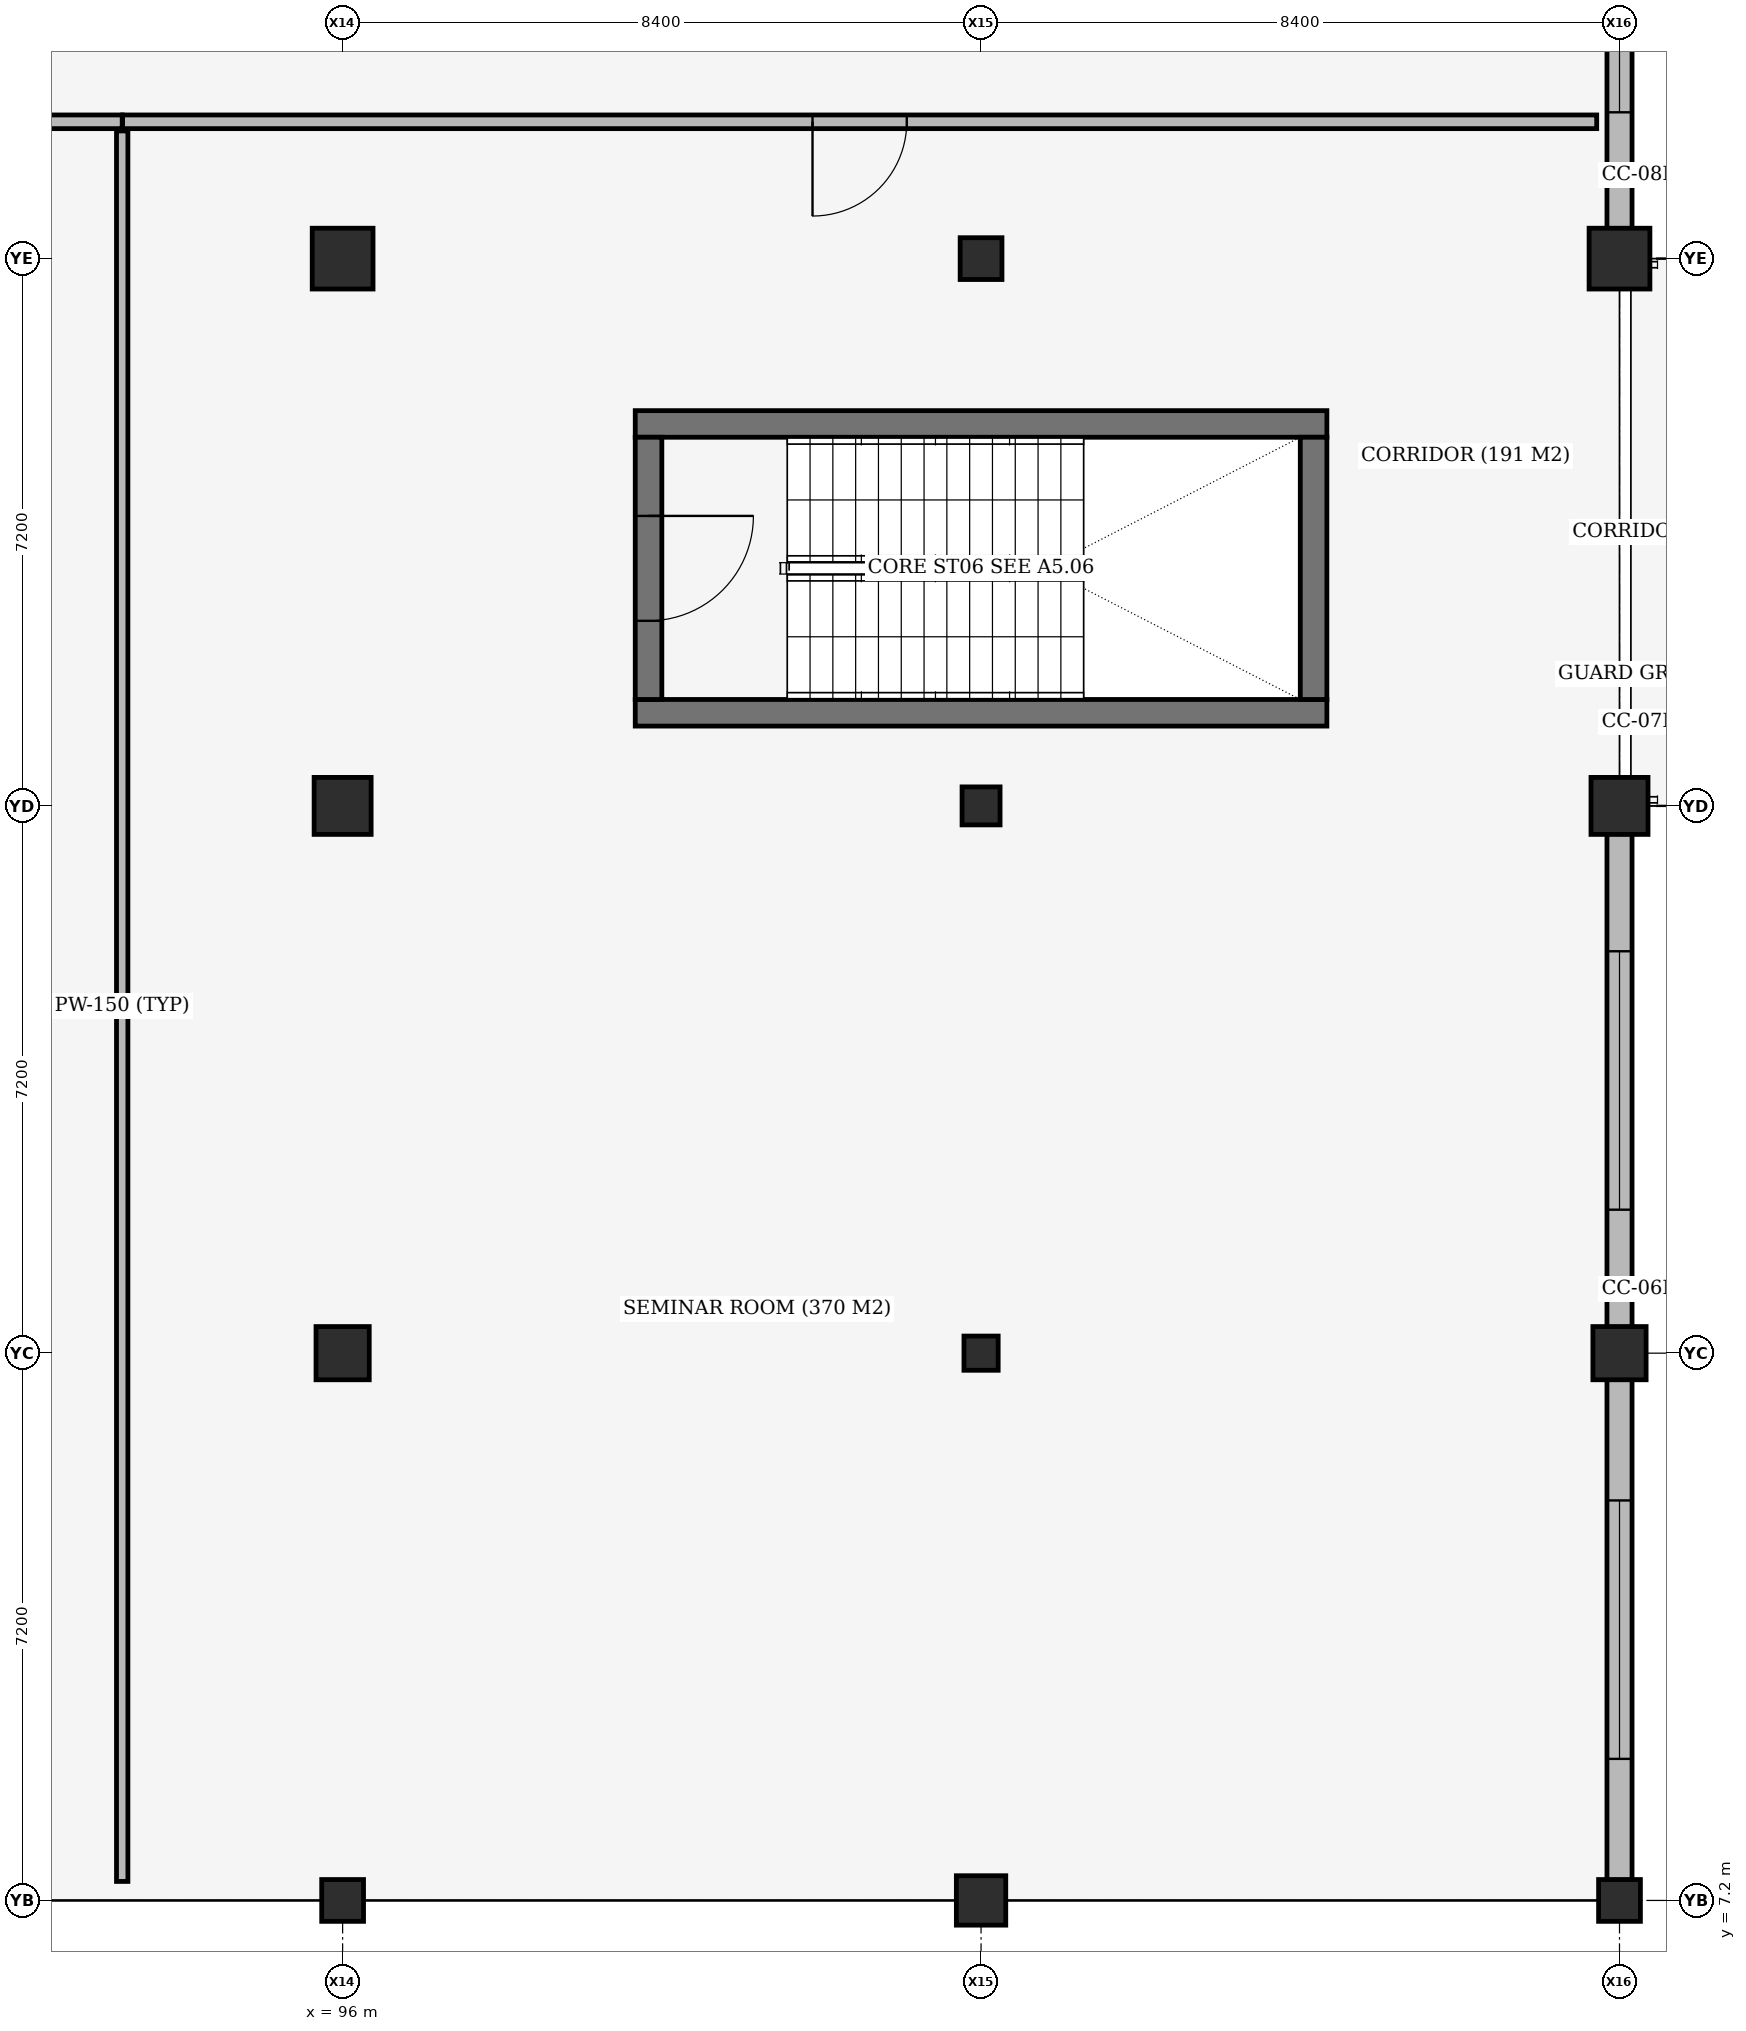
"""IFC4 building model, lengths in metres.
Left out: names, types, materials, properties, quantities, classifications, styles, units other than length and angle.
Written with IfcOpenShell. Run it as: python <this file> out.ifc"""

import sys

from ifc_helpers import new_model, si_unit, direction, frame, frame_2d, origin, origin_2d, place, context, subcontext, project, spatial, rectangle, circle, extrude, element, fill, save


model = new_model("IFC4")
c1 = context("Model", 3, precision=1e-05, world=origin(), true_north=direction((0.0, 1.0)))
c2 = subcontext(c1, "Body", "Model", "MODEL_VIEW")
j1 = project(units=[si_unit("LENGTHUNIT", "METRE"), si_unit("PLANEANGLEUNIT", "RADIAN")], contexts=[c1])
p1 = place(None, origin())
s1 = spatial("IfcSite", under=j1, at=p1, CompositionType="ELEMENT")
p2 = place(p1, origin())
s2 = spatial("IfcBuilding", under=s1, at=p2, CompositionType="ELEMENT")
p3 = place(p2, frame((0.0, 0.0, 5.4)))
s3 = spatial("IfcBuildingStorey", under=s2, at=p3, CompositionType="ELEMENT", Elevation=5.4)
p4 = place(p3, frame((96.0, 7.2, 0.0), z_axis=(0.0, 0.0, 1.0), x_axis=(1.0, 0.0, 0.0)))
e1 = element("IfcColumn", 1, at=p4, inside=s3, PredefinedType="COLUMN", context=c2, shape_type="SweptSolid", body=[
    extrude(circle(Radius=0.275, at=origin_2d()), origin(), (0.0, 0.0, 1.0), 3.96),
])
p5 = place(p3, frame((96.0, 14.4, 0.0), z_axis=(0.0, 0.0, 1.0), x_axis=(1.0, 0.0, 0.0)))
e2 = element("IfcColumn", 2, at=p5, inside=s3, PredefinedType="COLUMN", context=c2, shape_type="SweptSolid", body=[
    extrude(rectangle(XDim=0.7, YDim=0.7, at=origin_2d()), origin(), (0.0, 0.0, 1.0), 3.92),
])
p6 = place(p3, frame((96.0, 21.6, 0.0), z_axis=(0.0, 0.0, 1.0), x_axis=(1.0, 0.0, 0.0)))
e3 = element("IfcColumn", 3, at=p6, inside=s3, PredefinedType="COLUMN", context=c2, shape_type="SweptSolid", body=[
    extrude(rectangle(XDim=0.75, YDim=0.75, at=origin_2d()), origin(), (0.0, 0.0, 1.0), 3.92),
])
p7 = place(p3, frame((96.0, 28.8, 0.0), z_axis=(0.0, 0.0, 1.0), x_axis=(1.0, 0.0, 0.0)))
e4 = element("IfcColumn", 4, at=p7, inside=s3, PredefinedType="COLUMN", context=c2, shape_type="SweptSolid", body=[
    extrude(rectangle(XDim=0.8, YDim=0.8, at=origin_2d()), origin(), (0.0, 0.0, 1.0), 3.92),
])
p8 = place(p3, frame((104.4, 7.2, 0.0), z_axis=(0.0, 0.0, 1.0), x_axis=(1.0, 0.0, 0.0)))
e5 = element("IfcColumn", 5, at=p8, inside=s3, PredefinedType="COLUMN", context=c2, shape_type="SweptSolid", body=[
    extrude(circle(Radius=0.325, at=origin_2d()), origin(), (0.0, 0.0, 1.0), 3.96),
])
p9 = place(p3, frame((104.4, 14.4, 0.0), z_axis=(0.0, 0.0, 1.0), x_axis=(1.0, 0.0, 0.0)))
e6 = element("IfcColumn", 6, at=p9, inside=s3, PredefinedType="COLUMN", context=c2, shape_type="SweptSolid", body=[
    extrude(rectangle(XDim=0.45, YDim=0.45, at=origin_2d()), origin(), (0.0, 0.0, 1.0), 3.92),
])
p10 = place(p3, frame((104.4, 21.6, 0.0), z_axis=(0.0, 0.0, 1.0), x_axis=(1.0, 0.0, 0.0)))
e7 = element("IfcColumn", 7, at=p10, inside=s3, PredefinedType="COLUMN", context=c2, shape_type="SweptSolid", body=[
    extrude(rectangle(XDim=0.5, YDim=0.5, at=origin_2d()), origin(), (0.0, 0.0, 1.0), 3.92),
])
p11 = place(p3, frame((104.4, 28.8, 0.0), z_axis=(0.0, 0.0, 1.0), x_axis=(1.0, 0.0, 0.0)))
e8 = element("IfcColumn", 8, at=p11, inside=s3, PredefinedType="COLUMN", context=c2, shape_type="SweptSolid", body=[
    extrude(rectangle(XDim=0.55, YDim=0.55, at=origin_2d()), origin(), (0.0, 0.0, 1.0), 3.92),
])
p12 = place(p3, frame((112.8, 7.2, 0.0), z_axis=(0.0, 0.0, 1.0), x_axis=(1.0, 0.0, 0.0)))
e9 = element("IfcColumn", 9, at=p12, inside=s3, PredefinedType="COLUMN", context=c2, shape_type="SweptSolid", body=[
    extrude(circle(Radius=0.275, at=origin_2d()), origin(), (0.0, 0.0, 1.0), 3.96),
])
p13 = place(p3, frame((112.8, 14.4, 0.0), z_axis=(0.0, 0.0, 1.0), x_axis=(1.0, 0.0, 0.0)))
e10 = element("IfcColumn", 10, at=p13, inside=s3, PredefinedType="COLUMN", context=c2, shape_type="SweptSolid", body=[
    extrude(rectangle(XDim=0.7, YDim=0.7, at=origin_2d()), origin(), (0.0, 0.0, 1.0), 3.92),
])
p14 = place(p3, frame((112.8, 21.6, 0.0), z_axis=(0.0, 0.0, 1.0), x_axis=(1.0, 0.0, 0.0)))
e11 = element("IfcColumn", 11, at=p14, inside=s3, PredefinedType="COLUMN", context=c2, shape_type="SweptSolid", body=[
    extrude(rectangle(XDim=0.75, YDim=0.75, at=origin_2d()), origin(), (0.0, 0.0, 1.0), 3.92),
])
p15 = place(p3, frame((112.8, 28.8, 0.0), z_axis=(0.0, 0.0, 1.0), x_axis=(1.0, 0.0, 0.0)))
e12 = element("IfcColumn", 12, at=p15, inside=s3, PredefinedType="COLUMN", context=c2, shape_type="SweptSolid", body=[
    extrude(rectangle(XDim=0.8, YDim=0.8, at=origin_2d()), origin(), (0.0, 0.0, 1.0), 3.92),
])
for number, where, z_axis, x_axis in (
    (13, (99.85, 22.825, 0.0), (0.0, 0.0, 1.0), (1.0, 0.0, 0.0)),
    (14, (108.95, 26.625, 0.0), (0.0, 0.0, 1.0), (-1.0, 0.0, 0.0)),
):
    element("IfcWall", number, at=place(p3, frame(where, z_axis=z_axis, x_axis=x_axis)), inside=s3, PredefinedType="SHEAR", context=c2, shape_type="SweptSolid", body=[
        extrude(rectangle(XDim=9.1, YDim=0.35, at=frame_2d((4.55, 0.0))), origin(), (0.0, 0.0, 1.0), 3.92),
    ])
p16 = place(p3, frame((108.775, 23.0, 0.0), z_axis=(0.0, 0.0, 1.0), x_axis=(0.0, 1.0, 0.0)))
e15 = element("IfcWall", 15, at=p16, inside=s3, PredefinedType="SHEAR", context=c2, shape_type="SweptSolid", body=[
    extrude(rectangle(XDim=3.45, YDim=0.35, at=frame_2d((1.725, 0.0))), origin(), (0.0, 0.0, 1.0), 3.92),
])
p17 = place(p3, frame((112.8, 14.058, 0.0), z_axis=(0.0, 0.0, 1.0), x_axis=(0.0, -1.0, 0.0)))
e16 = element("IfcWall", 16, at=p17, inside=s3, PredefinedType="STANDARD", context=c2, shape_type="SweptSolid", body=[
    extrude(rectangle(XDim=6.591, YDim=0.33, at=frame_2d((3.295, 0.0))), origin(), (0.0, 0.0, 1.0), 3.92),
])
p18 = place(p17, frame((1.595, 0.0, 0.9)))
e17 = element("IfcOpeningElement", 17, at=p18, cuts=e16, PredefinedType="OPENING", context=c2, shape_type="SweptSolid", body=[
    extrude(rectangle(XDim=3.4, YDim=1.5, at=frame_2d((1.7, 0.75))), frame((0.0, 0.175, 0.0), z_axis=(0.0, -1.0, 0.0), x_axis=(1.0, 0.0, 0.0)), (0.0, 0.0, 1.0), 0.35),
])
p19 = place(p3, frame((112.8, 21.233, 0.0), z_axis=(0.0, 0.0, 1.0), x_axis=(0.0, -1.0, 0.0)))
e18 = element("IfcWall", 18, at=p19, inside=s3, PredefinedType="STANDARD", context=c2, shape_type="SweptSolid", body=[
    extrude(rectangle(XDim=6.491, YDim=0.33, at=frame_2d((3.246, 0.0))), origin(), (0.0, 0.0, 1.0), 3.34),
])
p20 = place(p19, frame((1.545, 0.0, 0.9)))
e19 = element("IfcOpeningElement", 19, at=p20, cuts=e18, PredefinedType="OPENING", context=c2, shape_type="SweptSolid", body=[
    extrude(rectangle(XDim=3.4, YDim=1.5, at=frame_2d((1.7, 0.75))), frame((0.0, 0.175, 0.0), z_axis=(0.0, -1.0, 0.0), x_axis=(1.0, 0.0, 0.0)), (0.0, 0.0, 1.0), 0.35),
])
p21 = place(p3, frame((112.8, 35.658, 0.0), z_axis=(0.0, 0.0, 1.0), x_axis=(0.0, -1.0, 0.0)))
e20 = element("IfcWall", 20, at=p21, inside=s3, PredefinedType="STANDARD", context=c2, shape_type="SweptSolid", body=[
    extrude(rectangle(XDim=6.466, YDim=0.33, at=frame_2d((3.233, 0.0))), origin(), (0.0, 0.0, 1.0), 3.24),
])
p22 = place(p21, frame((1.533, 0.0, 0.9)))
e21 = element("IfcOpeningElement", 21, at=p22, cuts=e20, PredefinedType="OPENING", context=c2, shape_type="SweptSolid", body=[
    extrude(rectangle(XDim=3.4, YDim=1.5, at=frame_2d((1.7, 0.75))), frame((0.0, 0.175, 0.0), z_axis=(0.0, -1.0, 0.0), x_axis=(1.0, 0.0, 0.0)), (0.0, 0.0, 1.0), 0.35),
])
p23 = place(p3, frame((100.025, 26.45, 0.0), z_axis=(0.0, 0.0, 1.0), x_axis=(0.0, -1.0, 0.0)))
e22 = element("IfcWall", 22, at=p23, inside=s3, PredefinedType="SHEAR", context=c2, shape_type="SweptSolid", body=[
    extrude(rectangle(XDim=3.45, YDim=0.35, at=frame_2d((1.725, 0.0))), origin(), (0.0, 0.0, 1.0), 3.92),
])
p24 = place(p23, frame((1.035, 0.0, 0.0)))
e23 = element("IfcOpeningElement", 23, at=p24, cuts=e22, PredefinedType="OPENING", context=c2, shape_type="SweptSolid", body=[
    extrude(rectangle(XDim=1.38, YDim=2.2, at=frame_2d((0.69, 1.1))), frame((0.0, 0.185, 0.0), z_axis=(0.0, -1.0, 0.0), x_axis=(1.0, 0.0, 0.0)), (0.0, 0.0, 1.0), 0.37),
])
p25 = place(p3, frame((79.205, 30.6, 0.0), z_axis=(0.0, 0.0, 1.0), x_axis=(1.0, 0.0, 0.0)))
e24 = element("IfcWall", 24, at=p25, inside=s3, PredefinedType="PARTITIONING", context=c2, shape_type="SweptSolid", body=[
    extrude(rectangle(XDim=13.895, YDim=0.18, at=frame_2d((6.948, 0.0))), origin(), (0.0, 0.0, 1.0), 3.28),
])
p26 = place(p25, frame((6.337, 0.0, 0.0)))
e25 = element("IfcOpeningElement", 25, at=p26, cuts=e24, PredefinedType="OPENING", context=c2, shape_type="SweptSolid", body=[
    extrude(rectangle(XDim=1.22, YDim=2.25, at=frame_2d((0.61, 1.125))), frame((0.0, 0.1, 0.0), z_axis=(0.0, -1.0, 0.0), x_axis=(1.0, 0.0, 0.0)), (0.0, 0.0, 1.0), 0.2),
])
p27 = place(p3, frame((93.1, 7.45, 0.0), z_axis=(0.0, 0.0, 1.0), x_axis=(0.0, 1.0, 0.0)))
e26 = element("IfcWall", 26, at=p27, inside=s3, PredefinedType="PARTITIONING", context=c2, shape_type="SweptSolid", body=[
    extrude(rectangle(XDim=23.03, YDim=0.15, at=frame_2d((11.515, 0.0))), origin(), (0.0, 0.0, 1.0), 3.24),
])
p28 = place(p3, frame((93.105, 30.6, 0.0), z_axis=(0.0, 0.0, 1.0), x_axis=(1.0, 0.0, 0.0)))
e27 = element("IfcWall", 27, at=p28, inside=s3, PredefinedType="PARTITIONING", context=c2, shape_type="SweptSolid", body=[
    extrude(rectangle(XDim=19.395, YDim=0.18, at=frame_2d((9.698, 0.0))), origin(), (0.0, 0.0, 1.0), 3.24),
])
p29 = place(p28, frame((9.077, 0.0, 0.0)))
e28 = element("IfcOpeningElement", 28, at=p29, cuts=e27, PredefinedType="OPENING", context=c2, shape_type="SweptSolid", body=[
    extrude(rectangle(XDim=1.24, YDim=2.25, at=frame_2d((0.62, 1.125))), frame((0.0, 0.1, 0.0), z_axis=(0.0, -1.0, 0.0), x_axis=(1.0, 0.0, 0.0)), (0.0, 0.0, 1.0), 0.2),
])
p30 = place(p18, origin())
e29 = element("IfcWindow", 29, at=p30, inside=s3, PartitioningType="DOUBLE_PANEL_VERTICAL", PredefinedType="WINDOW", context=c2, shape_type="SweptSolid", body=[
    extrude(rectangle(XDim=3.4, YDim=1.5, at=frame_2d((1.7, 0.75))), frame((0.0, 0.03, 0.0), z_axis=(0.0, -1.0, 0.0), x_axis=(1.0, 0.0, 0.0)), (0.0, 0.0, 1.0), 0.06),
])
fill(e17, e29)
p31 = place(p20, origin())
e30 = element("IfcWindow", 30, at=p31, inside=s3, PartitioningType="DOUBLE_PANEL_VERTICAL", PredefinedType="WINDOW", context=c2, shape_type="SweptSolid", body=[
    extrude(rectangle(XDim=3.4, YDim=1.5, at=frame_2d((1.7, 0.75))), frame((0.0, 0.03, 0.0), z_axis=(0.0, -1.0, 0.0), x_axis=(1.0, 0.0, 0.0)), (0.0, 0.0, 1.0), 0.06),
])
fill(e19, e30)
p32 = place(p22, origin())
e31 = element("IfcWindow", 31, at=p32, inside=s3, PartitioningType="DOUBLE_PANEL_VERTICAL", PredefinedType="WINDOW", context=c2, shape_type="SweptSolid", body=[
    extrude(rectangle(XDim=3.4, YDim=1.5, at=frame_2d((1.7, 0.75))), frame((0.0, 0.03, 0.0), z_axis=(0.0, -1.0, 0.0), x_axis=(1.0, 0.0, 0.0)), (0.0, 0.0, 1.0), 0.06),
])
fill(e21, e31)
p33 = place(p24, origin())
e32 = element("IfcDoor", 32, at=p33, inside=s3, OperationType="DOUBLE_DOOR_SINGLE_SWING", PredefinedType="DOOR", context=c2, shape_type="SweptSolid", body=[
    extrude(rectangle(XDim=1.38, YDim=2.2, at=frame_2d((0.69, 1.1))), frame((0.0, 0.025, 0.0), z_axis=(0.0, -1.0, 0.0), x_axis=(1.0, 0.0, 0.0)), (0.0, 0.0, 1.0), 0.05),
])
fill(e23, e32)
p34 = place(p29, origin())
e33 = element("IfcDoor", 33, at=p34, inside=s3, OperationType="SINGLE_SWING_RIGHT", PredefinedType="DOOR", context=c2, shape_type="SweptSolid", body=[
    extrude(rectangle(XDim=1.24, YDim=2.25, at=frame_2d((0.62, 1.125))), frame((0.0, 0.025, 0.0), z_axis=(0.0, -1.0, 0.0), x_axis=(1.0, 0.0, 0.0)), (0.0, 0.0, 1.0), 0.05),
])
fill(e28, e33)
save(model, sys.argv[1])
